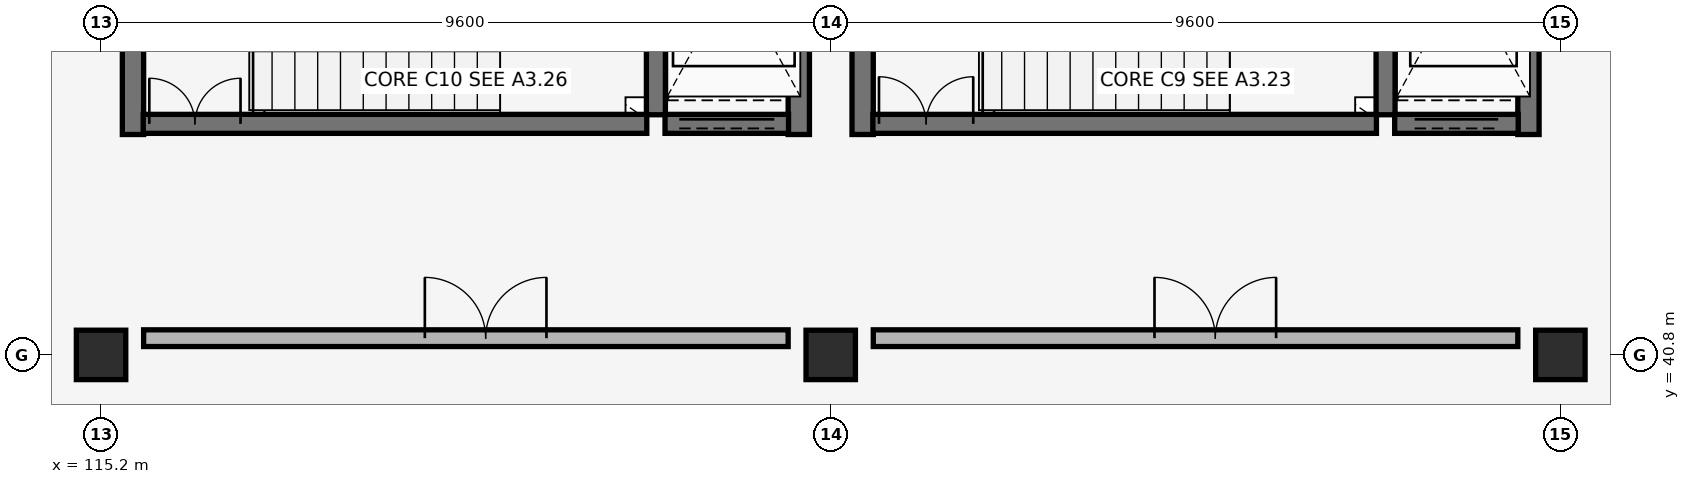
"""IFC4 building model, lengths in metres.
Left out: names, types, materials, properties, quantities, classifications, styles, units other than length and angle.
Written with IfcOpenShell. Run it as: python <this file> out.ifc"""

import sys

from ifc_helpers import new_model, si_unit, direction, frame, frame_2d, origin, origin_2d, place, context, subcontext, project, spatial, rectangle, extrude, element, fill, save


model = new_model("IFC4")
c1 = context("Model", 3, precision=1e-05, world=origin(), true_north=direction((0.0, 1.0)))
c2 = subcontext(c1, "Body", "Model", "MODEL_VIEW")
j1 = project(units=[si_unit("LENGTHUNIT", "METRE"), si_unit("PLANEANGLEUNIT", "RADIAN")], contexts=[c1])
p1 = place(None, origin())
s1 = spatial("IfcSite", under=j1, at=p1, CompositionType="ELEMENT")
p2 = place(p1, origin())
s2 = spatial("IfcBuilding", under=s1, at=p2, CompositionType="ELEMENT")
p3 = place(p2, frame((0.0, 0.0, 8.5)))
s3 = spatial("IfcBuildingStorey", under=s2, at=p3, CompositionType="ELEMENT", Elevation=8.5)
for number, where, z_axis, x_axis in (
    (1, (115.2, 40.8, 0.0), (0.0, 0.0, 1.0), (1.0, 0.0, 0.0)),
    (2, (124.8, 40.8, 0.0), (0.0, 0.0, 1.0), (1.0, 0.0, 0.0)),
    (3, (134.4, 40.8, 0.0), (0.0, 0.0, 1.0), (1.0, 0.0, 0.0)),
):
    element("IfcColumn", number, at=place(p3, frame(where, z_axis=z_axis, x_axis=x_axis)), inside=s3, PredefinedType="COLUMN", context=c2, shape_type="SweptSolid", body=[
        extrude(rectangle(XDim=0.65, YDim=0.65, at=origin_2d()), origin(), (0.0, 0.0, 1.0), 4.08),
    ])
for number, where, z_axis, x_axis in (
    (4, (125.22, 43.7, 0.0), (0.0, 0.0, 1.0), (0.0, 1.0, 0.0)),
    (5, (133.98, 43.7, 0.0), (0.0, 0.0, 1.0), (0.0, 1.0, 0.0)),
):
    element("IfcWall", number, at=place(p3, frame(where, z_axis=z_axis, x_axis=x_axis)), inside=s3, PredefinedType="SHEAR", context=c2, shape_type="SweptSolid", body=[
        extrude(rectangle(XDim=4.08, YDim=0.28, at=frame_2d((2.04, 0.0))), origin(), (0.0, 0.0, 1.0), 3.78),
    ])
p4 = place(p3, frame((132.1, 43.96, 0.0), z_axis=(0.0, 0.0, 1.0), x_axis=(0.0, 1.0, 0.0)))
e6 = element("IfcWall", 6, at=p4, inside=s3, PredefinedType="SHEAR", context=c2, shape_type="SweptSolid", body=[
    extrude(rectangle(XDim=3.54, YDim=0.25, at=frame_2d((1.77, 0.0))), origin(), (0.0, 0.0, 1.0), 3.78),
])
p5 = place(p3, frame((125.355, 43.84, 0.0), z_axis=(0.0, 0.0, 1.0), x_axis=(1.0, 0.0, 0.0)))
e7 = element("IfcWall", 7, at=p5, inside=s3, PredefinedType="SHEAR", context=c2, shape_type="SweptSolid", body=[
    extrude(rectangle(XDim=6.625, YDim=0.25, at=frame_2d((3.312, 0.0))), origin(), (0.0, 0.0, 1.0), 3.78),
])
p6 = place(p5, frame((0.08, 0.0, 0.0)))
e8 = element("IfcOpeningElement", 8, at=p6, cuts=e7, PredefinedType="OPENING", context=c2, shape_type="SweptSolid", body=[
    extrude(rectangle(XDim=1.24, YDim=2.15, at=frame_2d((0.62, 1.075))), frame((0.0, 0.135, 0.0), z_axis=(0.0, -1.0, 0.0), x_axis=(1.0, 0.0, 0.0)), (0.0, 0.0, 1.0), 0.27),
])
p7 = place(p3, frame((125.36, 41.02, 0.0), z_axis=(0.0, 0.0, 1.0), x_axis=(1.0, 0.0, 0.0)))
e9 = element("IfcWall", 9, at=p7, inside=s3, PredefinedType="PARTITIONING", context=c2, shape_type="SweptSolid", body=[
    extrude(rectangle(XDim=8.48, YDim=0.22, at=frame_2d((4.24, 0.0))), origin(), (0.0, 0.0, 1.0), 3.06),
])
p8 = place(p7, frame((3.7, 0.0, 0.0)))
e10 = element("IfcOpeningElement", 10, at=p8, cuts=e9, PredefinedType="OPENING", context=c2, shape_type="SweptSolid", body=[
    extrude(rectangle(XDim=1.6, YDim=2.2, at=frame_2d((0.8, 1.1))), frame((0.0, 0.12, 0.0), z_axis=(0.0, -1.0, 0.0), x_axis=(1.0, 0.0, 0.0)), (0.0, 0.0, 1.0), 0.24),
])
p9 = place(p3, frame((132.22, 43.84, 0.0), z_axis=(0.0, 0.0, 1.0), x_axis=(1.0, 0.0, 0.0)))
e11 = element("IfcWall", 11, at=p9, inside=s3, PredefinedType="SHEAR", context=c2, shape_type="SweptSolid", body=[
    extrude(rectangle(XDim=1.625, YDim=0.25, at=frame_2d((0.812, 0.0))), origin(), (0.0, 0.0, 1.0), 3.78),
])
p10 = place(p9, frame((0.262, 0.0, 0.0)))
e12 = element("IfcOpeningElement", 12, at=p10, cuts=e11, PredefinedType="OPENING", context=c2, shape_type="SweptSolid", body=[
    extrude(rectangle(XDim=1.1, YDim=2.15, at=frame_2d((0.55, 1.075))), frame((0.0, 0.135, 0.0), z_axis=(0.0, -1.0, 0.0), x_axis=(1.0, 0.0, 0.0)), (0.0, 0.0, 1.0), 0.27),
])
for number, where, z_axis, x_axis in (
    (13, (115.62, 43.7, 0.0), (0.0, 0.0, 1.0), (0.0, 1.0, 0.0)),
    (14, (124.38, 43.7, 0.0), (0.0, 0.0, 1.0), (0.0, 1.0, 0.0)),
):
    element("IfcWall", number, at=place(p3, frame(where, z_axis=z_axis, x_axis=x_axis)), inside=s3, PredefinedType="SHEAR", context=c2, shape_type="SweptSolid", body=[
        extrude(rectangle(XDim=4.08, YDim=0.28, at=frame_2d((2.04, 0.0))), origin(), (0.0, 0.0, 1.0), 3.78),
    ])
p11 = place(p3, frame((122.5, 43.96, 0.0), z_axis=(0.0, 0.0, 1.0), x_axis=(0.0, 1.0, 0.0)))
e15 = element("IfcWall", 15, at=p11, inside=s3, PredefinedType="SHEAR", context=c2, shape_type="SweptSolid", body=[
    extrude(rectangle(XDim=3.54, YDim=0.25, at=frame_2d((1.77, 0.0))), origin(), (0.0, 0.0, 1.0), 3.78),
])
p12 = place(p3, frame((115.755, 43.84, 0.0), z_axis=(0.0, 0.0, 1.0), x_axis=(1.0, 0.0, 0.0)))
e16 = element("IfcWall", 16, at=p12, inside=s3, PredefinedType="SHEAR", context=c2, shape_type="SweptSolid", body=[
    extrude(rectangle(XDim=6.625, YDim=0.25, at=frame_2d((3.312, 0.0))), origin(), (0.0, 0.0, 1.0), 3.78),
])
p13 = place(p12, frame((0.08, 0.0, 0.0)))
e17 = element("IfcOpeningElement", 17, at=p13, cuts=e16, PredefinedType="OPENING", context=c2, shape_type="SweptSolid", body=[
    extrude(rectangle(XDim=1.2, YDim=2.15, at=frame_2d((0.6, 1.075))), frame((0.0, 0.135, 0.0), z_axis=(0.0, -1.0, 0.0), x_axis=(1.0, 0.0, 0.0)), (0.0, 0.0, 1.0), 0.27),
])
p14 = place(p3, frame((115.76, 41.02, 0.0), z_axis=(0.0, 0.0, 1.0), x_axis=(1.0, 0.0, 0.0)))
e18 = element("IfcWall", 18, at=p14, inside=s3, PredefinedType="PARTITIONING", context=c2, shape_type="SweptSolid", body=[
    extrude(rectangle(XDim=8.48, YDim=0.22, at=frame_2d((4.24, 0.0))), origin(), (0.0, 0.0, 1.0), 3.06),
])
p15 = place(p14, frame((3.7, 0.0, 0.0)))
e19 = element("IfcOpeningElement", 19, at=p15, cuts=e18, PredefinedType="OPENING", context=c2, shape_type="SweptSolid", body=[
    extrude(rectangle(XDim=1.6, YDim=2.2, at=frame_2d((0.8, 1.1))), frame((0.0, 0.12, 0.0), z_axis=(0.0, -1.0, 0.0), x_axis=(1.0, 0.0, 0.0)), (0.0, 0.0, 1.0), 0.24),
])
p16 = place(p3, frame((122.62, 43.84, 0.0), z_axis=(0.0, 0.0, 1.0), x_axis=(1.0, 0.0, 0.0)))
e20 = element("IfcWall", 20, at=p16, inside=s3, PredefinedType="SHEAR", context=c2, shape_type="SweptSolid", body=[
    extrude(rectangle(XDim=1.625, YDim=0.25, at=frame_2d((0.812, 0.0))), origin(), (0.0, 0.0, 1.0), 3.78),
])
p17 = place(p16, frame((0.188, 0.0, 0.0)))
e21 = element("IfcOpeningElement", 21, at=p17, cuts=e20, PredefinedType="OPENING", context=c2, shape_type="SweptSolid", body=[
    extrude(rectangle(XDim=1.25, YDim=2.15, at=frame_2d((0.625, 1.075))), frame((0.0, 0.135, 0.0), z_axis=(0.0, -1.0, 0.0), x_axis=(1.0, 0.0, 0.0)), (0.0, 0.0, 1.0), 0.27),
])
p18 = place(p6, origin())
e22 = element("IfcDoor", 22, at=p18, inside=s3, OperationType="DOUBLE_DOOR_SINGLE_SWING", PredefinedType="DOOR", context=c2, shape_type="SweptSolid", body=[
    extrude(rectangle(XDim=1.24, YDim=2.15, at=frame_2d((0.62, 1.075))), frame((0.0, 0.025, 0.0), z_axis=(0.0, -1.0, 0.0), x_axis=(1.0, 0.0, 0.0)), (0.0, 0.0, 1.0), 0.05),
])
fill(e8, e22)
p19 = place(p8, origin())
e23 = element("IfcDoor", 23, at=p19, inside=s3, OperationType="DOUBLE_DOOR_SINGLE_SWING", PredefinedType="DOOR", context=c2, shape_type="SweptSolid", body=[
    extrude(rectangle(XDim=1.6, YDim=2.2, at=frame_2d((0.8, 1.1))), frame((0.0, 0.025, 0.0), z_axis=(0.0, -1.0, 0.0), x_axis=(1.0, 0.0, 0.0)), (0.0, 0.0, 1.0), 0.05),
])
fill(e10, e23)
p20 = place(p10, origin())
e24 = element("IfcDoor", 24, at=p20, inside=s3, OperationType="DOUBLE_DOOR_SLIDING", PredefinedType="DOOR", context=c2, shape_type="SweptSolid", body=[
    extrude(rectangle(XDim=1.1, YDim=2.15, at=frame_2d((0.55, 1.075))), frame((0.0, 0.025, 0.0), z_axis=(0.0, -1.0, 0.0), x_axis=(1.0, 0.0, 0.0)), (0.0, 0.0, 1.0), 0.05),
])
fill(e12, e24)
p21 = place(p13, origin())
e25 = element("IfcDoor", 25, at=p21, inside=s3, OperationType="DOUBLE_DOOR_SINGLE_SWING", PredefinedType="DOOR", context=c2, shape_type="SweptSolid", body=[
    extrude(rectangle(XDim=1.2, YDim=2.15, at=frame_2d((0.6, 1.075))), frame((0.0, 0.025, 0.0), z_axis=(0.0, -1.0, 0.0), x_axis=(1.0, 0.0, 0.0)), (0.0, 0.0, 1.0), 0.05),
])
fill(e17, e25)
p22 = place(p15, origin())
e26 = element("IfcDoor", 26, at=p22, inside=s3, OperationType="DOUBLE_DOOR_SINGLE_SWING", PredefinedType="DOOR", context=c2, shape_type="SweptSolid", body=[
    extrude(rectangle(XDim=1.6, YDim=2.2, at=frame_2d((0.8, 1.1))), frame((0.0, 0.025, 0.0), z_axis=(0.0, -1.0, 0.0), x_axis=(1.0, 0.0, 0.0)), (0.0, 0.0, 1.0), 0.05),
])
fill(e19, e26)
p23 = place(p17, origin())
e27 = element("IfcDoor", 27, at=p23, inside=s3, OperationType="DOUBLE_DOOR_SLIDING", PredefinedType="DOOR", context=c2, shape_type="SweptSolid", body=[
    extrude(rectangle(XDim=1.25, YDim=2.15, at=frame_2d((0.625, 1.075))), frame((0.0, 0.025, 0.0), z_axis=(0.0, -1.0, 0.0), x_axis=(1.0, 0.0, 0.0)), (0.0, 0.0, 1.0), 0.05),
])
fill(e21, e27)
save(model, sys.argv[1])
